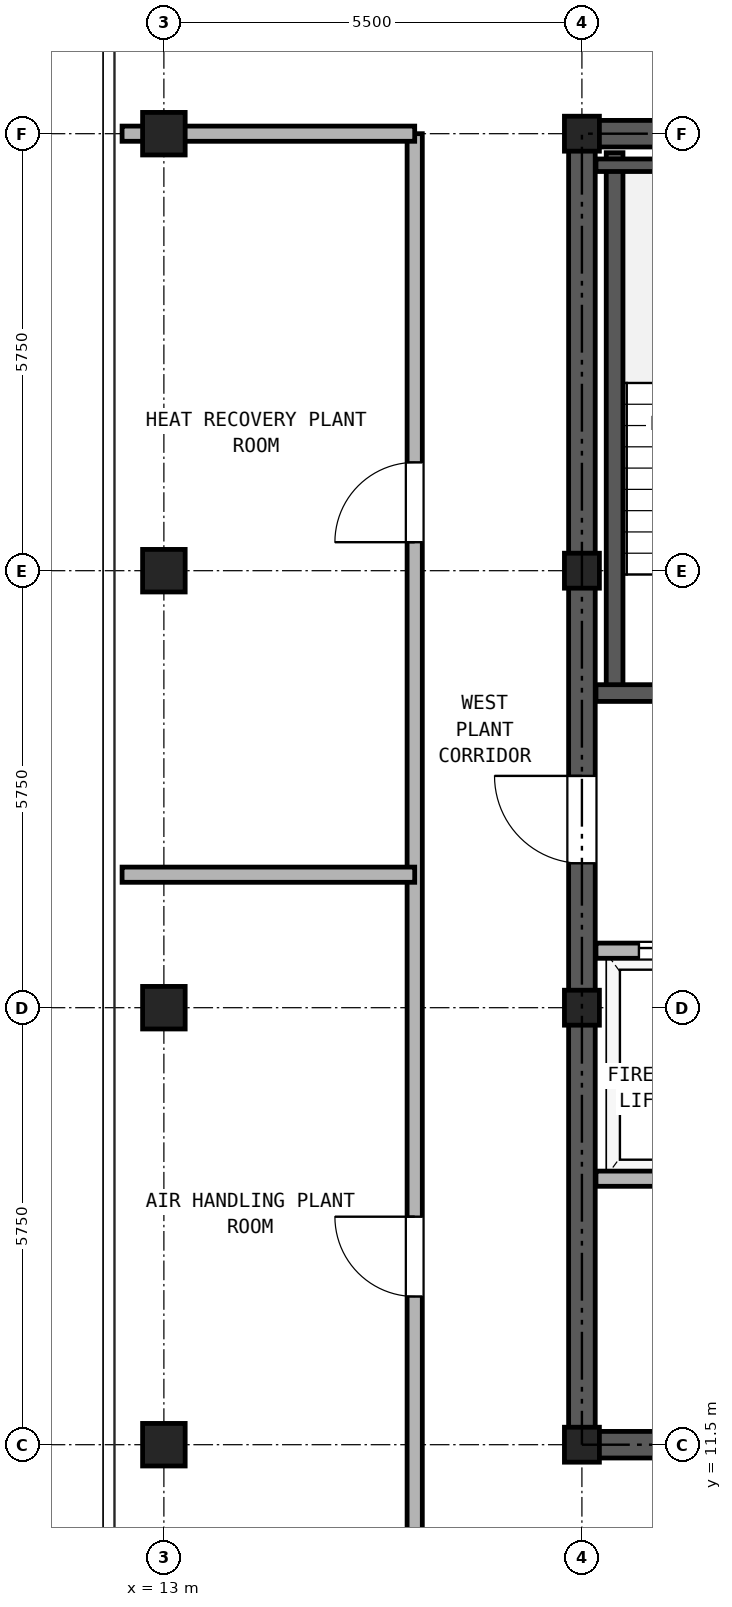
"""IFC4 building model, lengths in metres.
Left out: names, types, materials, properties, quantities, classifications, styles, units other than length and angle.
Written with IfcOpenShell. Run it as: python <this file> out.ifc"""

import sys

from ifc_helpers import new_model, si_unit, direction, frame, frame_2d, origin, origin_2d, place, context, subcontext, project, spatial, rectangle, hollow_rectangle, extrude, source, transform, mapped, element, fill, save


model = new_model("IFC4")
c1 = context("Model", 3, precision=1e-05, world=origin(), true_north=direction((0.0, 1.0)))
c2 = subcontext(c1, "Body", "Model", "MODEL_VIEW")
j1 = project(units=[si_unit("LENGTHUNIT", "METRE"), si_unit("PLANEANGLEUNIT", "RADIAN")], contexts=[c1])
p1 = place(None, origin())
s1 = spatial("IfcSite", under=j1, at=p1, CompositionType="ELEMENT")
p2 = place(p1, origin())
s2 = spatial("IfcBuilding", under=s1, at=p2, CompositionType="ELEMENT")
p3 = place(p2, frame((0.0, 0.0, 285.7)))
s3 = spatial("IfcBuildingStorey", under=s2, at=p3, CompositionType="ELEMENT", Elevation=285.7)
m1 = source(origin(), c2, "Body", "SweptSolid", [
    extrude(hollow_rectangle(XDim=0.56, YDim=0.56, WallThickness=0.03, at=origin_2d()), origin(), (0.0, 0.0, 1.0), 3.38),
])
for number, where, z_axis, x_axis in (
    (1, (13.0, 11.5, 0.0), (0.0, 0.0, 1.0), (1.0, 0.0, 0.0)),
    (2, (13.0, 17.25, 0.0), (0.0, 0.0, 1.0), (1.0, 0.0, 0.0)),
    (3, (13.0, 23.0, 0.0), (0.0, 0.0, 1.0), (1.0, 0.0, 0.0)),
    (4, (13.0, 28.75, 0.0), (0.0, 0.0, 1.0), (1.0, 0.0, 0.0)),
):
    element("IfcColumn", number, at=place(p3, frame(where, z_axis=z_axis, x_axis=x_axis)), inside=s3, PredefinedType="COLUMN", context=c2, shape_type="MappedRepresentation", body=[
        mapped(m1, transform((0.0, 0.0, 0.0), x_axis=(1.0, 0.0, 0.0), y_axis=(0.0, 1.0, 0.0), z_axis=(0.0, 0.0, 1.0), scale=1.0)),
    ])
m2 = source(origin(), c2, "Body", "SweptSolid", [
    extrude(hollow_rectangle(XDim=0.46, YDim=0.46, WallThickness=0.025, at=origin_2d()), origin(), (0.0, 0.0, 1.0), 3.38),
])
for number, where, z_axis, x_axis in (
    (5, (18.5, 11.5, 0.0), (0.0, 0.0, 1.0), (1.0, 0.0, 0.0)),
    (6, (18.5, 17.25, 0.0), (0.0, 0.0, 1.0), (1.0, 0.0, 0.0)),
    (7, (18.5, 23.0, 0.0), (0.0, 0.0, 1.0), (1.0, 0.0, 0.0)),
    (8, (18.5, 28.75, 0.0), (0.0, 0.0, 1.0), (1.0, 0.0, 0.0)),
):
    element("IfcColumn", number, at=place(p3, frame(where, z_axis=z_axis, x_axis=x_axis)), inside=s3, PredefinedType="COLUMN", context=c2, shape_type="MappedRepresentation", body=[
        mapped(m2, transform((0.0, 0.0, 0.0), x_axis=(1.0, 0.0, 0.0), y_axis=(0.0, 1.0, 0.0), z_axis=(0.0, 0.0, 1.0), scale=1.0)),
    ])
p4 = place(p3, frame((18.325, 11.5, 0.0), z_axis=(0.0, 0.0, 1.0), x_axis=(1.0, 0.0, 0.0)))
e9 = element("IfcWall", 9, at=p4, inside=s3, PredefinedType="SHEAR", context=c2, shape_type="SweptSolid", body=[
    extrude(rectangle(XDim=10.35, YDim=0.35, at=frame_2d((5.175, 0.0))), origin(), (0.0, 0.0, 1.0), 3.38),
])
p5 = place(p4, frame((4.375, 0.0, 0.0)))
e10 = element("IfcOpeningElement", 10, at=p5, cuts=e9, PredefinedType="OPENING", context=c2, shape_type="SweptSolid", body=[
    extrude(rectangle(XDim=1.5, YDim=2.25, at=frame_2d((0.75, 1.125))), frame((0.0, 0.185, 0.0), z_axis=(0.0, -1.0, 0.0), x_axis=(1.0, 0.0, 0.0)), (0.0, 0.0, 1.0), 0.37),
])
p6 = place(p3, frame((18.325, 28.75, 0.0), z_axis=(0.0, 0.0, 1.0), x_axis=(1.0, 0.0, 0.0)))
e11 = element("IfcWall", 11, at=p6, inside=s3, PredefinedType="SHEAR", context=c2, shape_type="SweptSolid", body=[
    extrude(rectangle(XDim=10.35, YDim=0.35, at=frame_2d((5.175, 0.0))), origin(), (0.0, 0.0, 1.0), 3.38),
])
p7 = place(p6, frame((4.055, 0.0, 0.0)))
e12 = element("IfcOpeningElement", 12, at=p7, cuts=e11, PredefinedType="OPENING", context=c2, shape_type="SweptSolid", body=[
    extrude(rectangle(XDim=0.9, YDim=2.05, at=frame_2d((0.45, 1.025))), frame((0.0, 0.185, 0.0), z_axis=(0.0, -1.0, 0.0), x_axis=(1.0, 0.0, 0.0)), (0.0, 0.0, 1.0), 0.37),
])
p8 = place(p6, frame((5.595, 0.0, 0.0)))
e13 = element("IfcOpeningElement", 13, at=p8, cuts=e11, PredefinedType="OPENING", context=c2, shape_type="SweptSolid", body=[
    extrude(rectangle(XDim=0.9, YDim=2.05, at=frame_2d((0.45, 1.025))), frame((0.0, 0.185, 0.0), z_axis=(0.0, -1.0, 0.0), x_axis=(1.0, 0.0, 0.0)), (0.0, 0.0, 1.0), 0.37),
])
p9 = place(p3, frame((18.5, 11.675, 0.0), z_axis=(0.0, 0.0, 1.0), x_axis=(0.0, 1.0, 0.0)))
e14 = element("IfcWall", 14, at=p9, inside=s3, PredefinedType="SHEAR", context=c2, shape_type="SweptSolid", body=[
    extrude(rectangle(XDim=16.9, YDim=0.35, at=frame_2d((8.45, 0.0))), origin(), (0.0, 0.0, 1.0), 3.38),
])
p10 = place(p9, frame((7.475, 0.0, 0.0)))
e15 = element("IfcOpeningElement", 15, at=p10, cuts=e14, PredefinedType="OPENING", context=c2, shape_type="SweptSolid", body=[
    extrude(rectangle(XDim=1.15, YDim=2.2, at=frame_2d((0.575, 1.1))), frame((0.0, 0.185, 0.0), z_axis=(0.0, -1.0, 0.0), x_axis=(1.0, 0.0, 0.0)), (0.0, 0.0, 1.0), 0.37),
])
p11 = place(p3, frame((18.93, 21.39, 0.0), z_axis=(0.0, 0.0, 1.0), x_axis=(0.0, 1.0, 0.0)))
e16 = element("IfcWall", 16, at=p11, inside=s3, PredefinedType="SOLIDWALL", context=c2, shape_type="SweptSolid", body=[
    extrude(rectangle(XDim=7.11, YDim=0.22, at=frame_2d((3.555, 0.0))), origin(), (0.0, 0.0, 1.0), 3.38),
])
p12 = place(p3, frame((18.685, 28.335, 0.0), z_axis=(0.0, 0.0, 1.0), x_axis=(1.0, 0.0, 0.0)))
e17 = element("IfcWall", 17, at=p12, inside=s3, PredefinedType="PARTITIONING", context=c2, shape_type="SweptSolid", body=[
    extrude(rectangle(XDim=3.425, YDim=0.165, at=frame_2d((1.712, 0.0))), origin(), (0.0, 0.0, 1.0), 3.38),
])
p13 = place(p3, frame((18.685, 21.39, 0.0), z_axis=(0.0, 0.0, 1.0), x_axis=(1.0, 0.0, 0.0)))
e18 = element("IfcWall", 18, at=p13, inside=s3, PredefinedType="SOLIDWALL", context=c2, shape_type="SweptSolid", body=[
    extrude(rectangle(XDim=6.445, YDim=0.22, at=frame_2d((3.222, 0.0))), origin(), (0.0, 0.0, 1.0), 3.38),
])
p14 = place(p13, frame((1.165, 0.0, 0.0)))
e19 = element("IfcOpeningElement", 19, at=p14, cuts=e18, PredefinedType="OPENING", context=c2, shape_type="SweptSolid", body=[
    extrude(rectangle(XDim=1.15, YDim=2.2, at=frame_2d((0.575, 1.1))), frame((0.0, 0.12, 0.0), z_axis=(0.0, -1.0, 0.0), x_axis=(1.0, 0.0, 0.0)), (0.0, 0.0, 1.0), 0.24),
])
p15 = place(p13, frame((4.935, 0.0, 0.0)))
e20 = element("IfcOpeningElement", 20, at=p15, cuts=e18, PredefinedType="OPENING", context=c2, shape_type="SweptSolid", body=[
    extrude(rectangle(XDim=1.05, YDim=2.15, at=frame_2d((0.525, 1.075))), frame((0.0, 0.12, 0.0), z_axis=(0.0, -1.0, 0.0), x_axis=(1.0, 0.0, 0.0)), (0.0, 0.0, 1.0), 0.24),
])
p16 = place(p3, frame((18.685, 18.0, 0.0), z_axis=(0.0, 0.0, 1.0), x_axis=(1.0, 0.0, 0.0)))
e21 = element("IfcWall", 21, at=p16, inside=s3, PredefinedType="PARTITIONING", context=c2, shape_type="SweptSolid", body=[
    extrude(rectangle(XDim=9.63, YDim=0.2, at=frame_2d((4.815, 0.0))), origin(), (0.0, 0.0, 1.0), 3.38),
])
p17 = place(p16, frame((0.565, 0.0, 0.0)))
e22 = element("IfcOpeningElement", 22, at=p17, cuts=e21, PredefinedType="OPENING", context=c2, shape_type="SweptSolid", body=[
    extrude(rectangle(XDim=1.3, YDim=2.3, at=frame_2d((0.65, 1.15))), frame((0.0, 0.11, 0.0), z_axis=(0.0, -1.0, 0.0), x_axis=(1.0, 0.0, 0.0)), (0.0, 0.0, 1.0), 0.22),
])
p18 = place(p16, frame((2.665, 0.0, 0.0)))
e23 = element("IfcOpeningElement", 23, at=p18, cuts=e21, PredefinedType="OPENING", context=c2, shape_type="SweptSolid", body=[
    extrude(rectangle(XDim=1.3, YDim=2.3, at=frame_2d((0.65, 1.15))), frame((0.0, 0.11, 0.0), z_axis=(0.0, -1.0, 0.0), x_axis=(1.0, 0.0, 0.0)), (0.0, 0.0, 1.0), 0.22),
])
p19 = place(p16, frame((5.065, 0.0, 0.0)))
e24 = element("IfcOpeningElement", 24, at=p19, cuts=e21, PredefinedType="OPENING", context=c2, shape_type="SweptSolid", body=[
    extrude(rectangle(XDim=0.9, YDim=2.05, at=frame_2d((0.45, 1.025))), frame((0.0, 0.11, 0.0), z_axis=(0.0, -1.0, 0.0), x_axis=(1.0, 0.0, 0.0)), (0.0, 0.0, 1.0), 0.22),
])
p20 = place(p16, frame((7.765, 0.0, 0.0)))
e25 = element("IfcOpeningElement", 25, at=p20, cuts=e21, PredefinedType="OPENING", context=c2, shape_type="SweptSolid", body=[
    extrude(rectangle(XDim=0.9, YDim=2.05, at=frame_2d((0.45, 1.025))), frame((0.0, 0.11, 0.0), z_axis=(0.0, -1.0, 0.0), x_axis=(1.0, 0.0, 0.0)), (0.0, 0.0, 1.0), 0.22),
])
p21 = place(p3, frame((18.685, 15.0, 0.0), z_axis=(0.0, 0.0, 1.0), x_axis=(1.0, 0.0, 0.0)))
e26 = element("IfcWall", 26, at=p21, inside=s3, PredefinedType="PARTITIONING", context=c2, shape_type="SweptSolid", body=[
    extrude(rectangle(XDim=9.63, YDim=0.2, at=frame_2d((4.815, 0.0))), origin(), (0.0, 0.0, 1.0), 3.38),
])
p22 = place(p3, frame((16.3, 8.9, 0.0), z_axis=(0.0, 0.0, 1.0), x_axis=(0.0, 1.0, 0.0)))
e27 = element("IfcWall", 27, at=p22, inside=s3, PredefinedType="PARTITIONING", context=c2, shape_type="SweptSolid", body=[
    extrude(rectangle(XDim=19.85, YDim=0.2, at=frame_2d((9.925, 0.0))), origin(), (0.0, 0.0, 1.0), 3.38),
])
p23 = place(p22, frame((4.55, 0.0, 0.0)))
e28 = element("IfcOpeningElement", 28, at=p23, cuts=e27, PredefinedType="OPENING", context=c2, shape_type="SweptSolid", body=[
    extrude(rectangle(XDim=1.05, YDim=2.15, at=frame_2d((0.525, 1.075))), frame((0.0, 0.11, 0.0), z_axis=(0.0, -1.0, 0.0), x_axis=(1.0, 0.0, 0.0)), (0.0, 0.0, 1.0), 0.22),
])
p24 = place(p22, frame((14.475, 0.0, 0.0)))
e29 = element("IfcOpeningElement", 29, at=p24, cuts=e27, PredefinedType="OPENING", context=c2, shape_type="SweptSolid", body=[
    extrude(rectangle(XDim=1.05, YDim=2.15, at=frame_2d((0.525, 1.075))), frame((0.0, 0.11, 0.0), z_axis=(0.0, -1.0, 0.0), x_axis=(1.0, 0.0, 0.0)), (0.0, 0.0, 1.0), 0.22),
])
p25 = place(p3, frame((12.45, 28.75, 0.0), z_axis=(0.0, 0.0, 1.0), x_axis=(1.0, 0.0, 0.0)))
e30 = element("IfcWall", 30, at=p25, inside=s3, PredefinedType="PARTITIONING", context=c2, shape_type="SweptSolid", body=[
    extrude(rectangle(XDim=3.85, YDim=0.2, at=frame_2d((1.925, 0.0))), origin(), (0.0, 0.0, 1.0), 2.905),
])
p26 = place(p3, frame((12.45, 19.0, 0.0), z_axis=(0.0, 0.0, 1.0), x_axis=(1.0, 0.0, 0.0)))
e31 = element("IfcWall", 31, at=p26, inside=s3, PredefinedType="PARTITIONING", context=c2, shape_type="SweptSolid", body=[
    extrude(rectangle(XDim=3.85, YDim=0.2, at=frame_2d((1.925, 0.0))), origin(), (0.0, 0.0, 1.0), 3.38),
])
p27 = place(p17, origin())
e32 = element("IfcDoor", 32, at=p27, inside=s3, OperationType="DOUBLE_DOOR_SLIDING", PredefinedType="DOOR", context=c2, shape_type="SweptSolid", body=[
    extrude(rectangle(XDim=1.3, YDim=2.3, at=frame_2d((0.65, 1.15))), frame((0.0, 0.025, 0.0), z_axis=(0.0, -1.0, 0.0), x_axis=(1.0, 0.0, 0.0)), (0.0, 0.0, 1.0), 0.05),
])
fill(e22, e32)
p28 = place(p10, frame((1.15, 0.0, 0.0), z_axis=(0.0, 0.0, 1.0), x_axis=(-1.0, 0.0, 0.0)))
e33 = element("IfcDoor", 33, at=p28, inside=s3, OperationType="SINGLE_SWING_RIGHT", PredefinedType="DOOR", context=c2, shape_type="SweptSolid", body=[
    extrude(rectangle(XDim=1.15, YDim=2.2, at=frame_2d((0.575, 1.1))), frame((0.0, 0.025, 0.0), z_axis=(0.0, -1.0, 0.0), x_axis=(1.0, 0.0, 0.0)), (0.0, 0.0, 1.0), 0.05),
])
fill(e15, e33)
p29 = place(p23, frame((1.05, 0.0, 0.0), z_axis=(0.0, 0.0, 1.0), x_axis=(-1.0, 0.0, 0.0)))
e34 = element("IfcDoor", 34, at=p29, inside=s3, OperationType="SINGLE_SWING_RIGHT", PredefinedType="DOOR", context=c2, shape_type="SweptSolid", body=[
    extrude(rectangle(XDim=1.05, YDim=2.15, at=frame_2d((0.525, 1.075))), frame((0.0, 0.025, 0.0), z_axis=(0.0, -1.0, 0.0), x_axis=(1.0, 0.0, 0.0)), (0.0, 0.0, 1.0), 0.05),
])
fill(e28, e34)
p30 = place(p24, frame((1.05, 0.0, 0.0), z_axis=(0.0, 0.0, 1.0), x_axis=(-1.0, 0.0, 0.0)))
e35 = element("IfcDoor", 35, at=p30, inside=s3, OperationType="SINGLE_SWING_LEFT", PredefinedType="DOOR", context=c2, shape_type="SweptSolid", body=[
    extrude(rectangle(XDim=1.05, YDim=2.15, at=frame_2d((0.525, 1.075))), frame((0.0, 0.025, 0.0), z_axis=(0.0, -1.0, 0.0), x_axis=(1.0, 0.0, 0.0)), (0.0, 0.0, 1.0), 0.05),
])
fill(e29, e35)
save(model, sys.argv[1])
